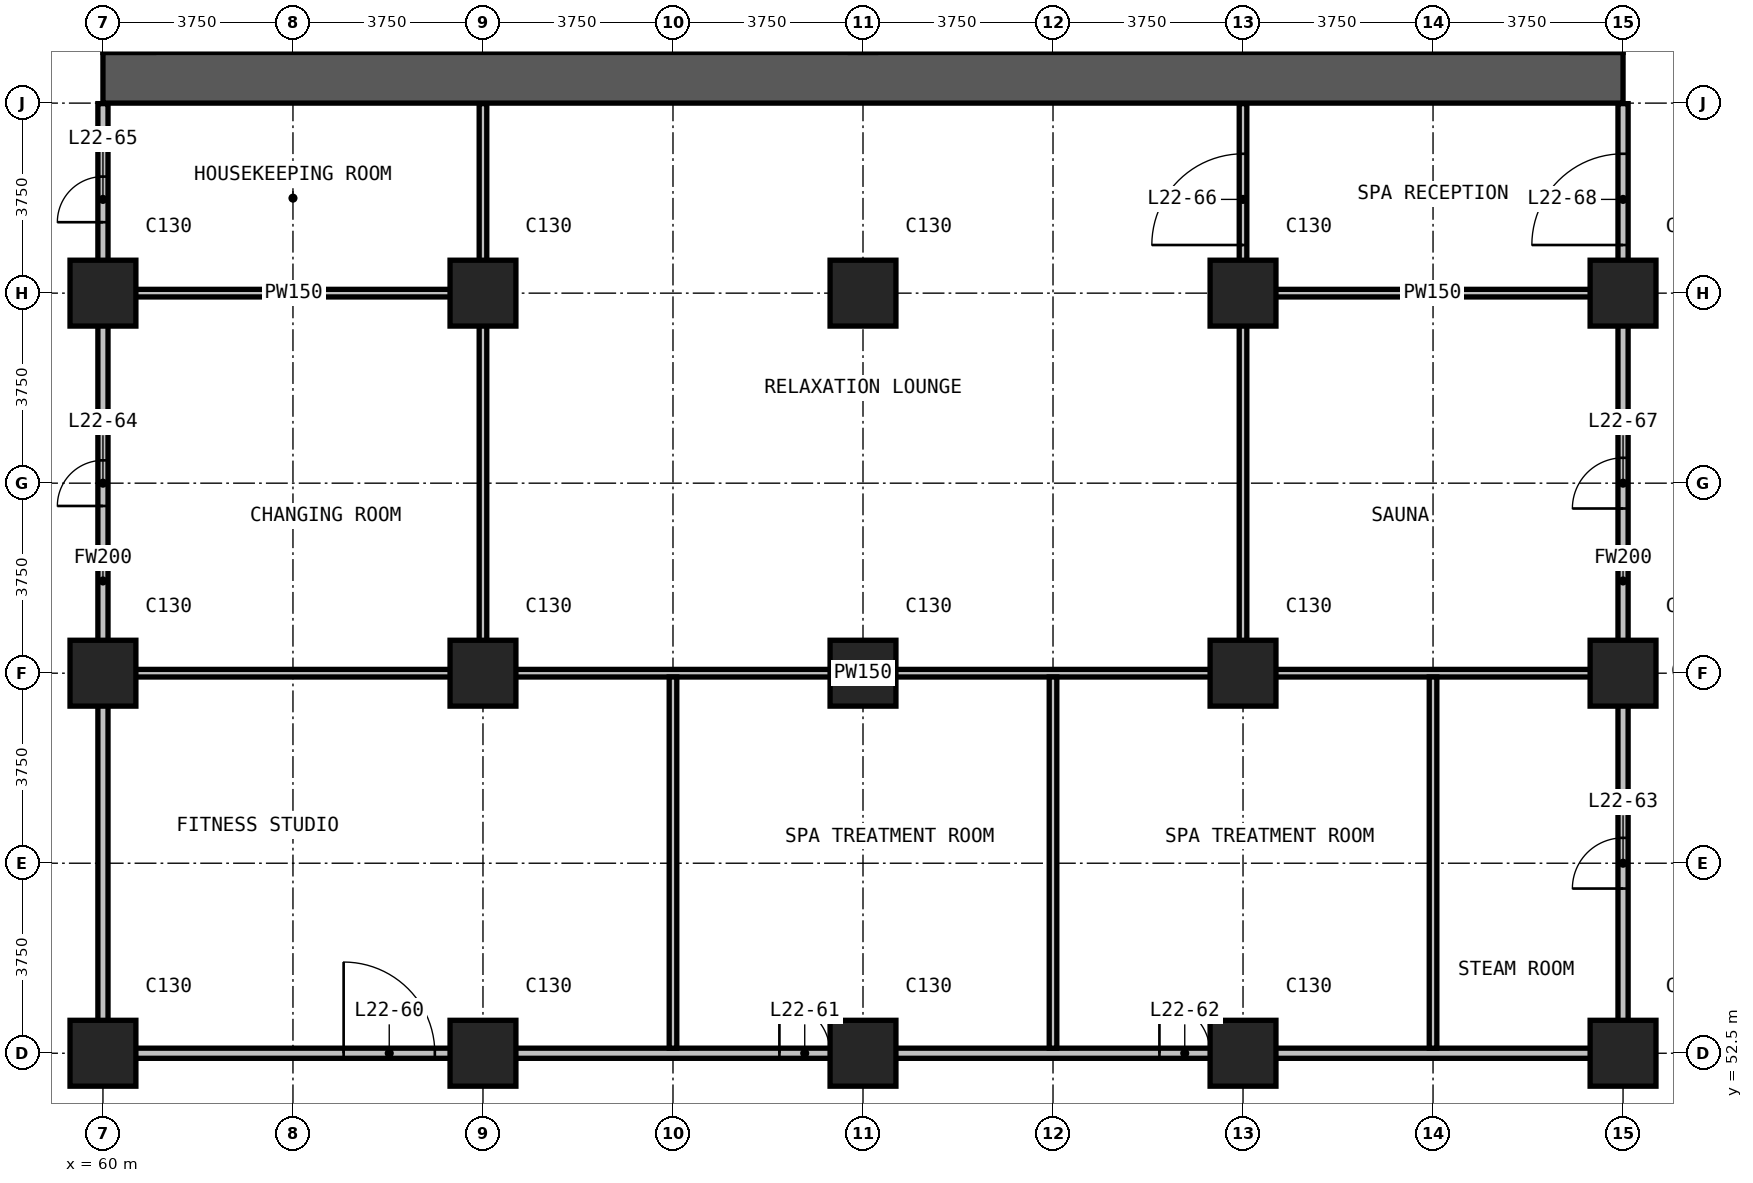
"""IFC4 building model, lengths in metres.
Left out: names, types, materials, properties, quantities, classifications, styles, units other than length and angle.
Written with IfcOpenShell. Run it as: python <this file> out.ifc"""

import sys

from ifc_helpers import new_model, si_unit, direction, frame, frame_2d, origin, origin_2d, place, context, subcontext, project, spatial, rectangle, extrude, element, fill, save


model = new_model("IFC4")
c1 = context("Model", 3, precision=1e-05, world=origin(), true_north=direction((0.0, 1.0)))
c2 = subcontext(c1, "Body", "Model", "MODEL_VIEW")
j1 = project(units=[si_unit("LENGTHUNIT", "METRE"), si_unit("PLANEANGLEUNIT", "RADIAN")], contexts=[c1])
p1 = place(None, origin())
s1 = spatial("IfcSite", under=j1, at=p1, CompositionType="ELEMENT")
p2 = place(p1, origin())
s2 = spatial("IfcBuilding", under=s1, at=p2, CompositionType="ELEMENT")
p3 = place(p2, frame((0.0, 0.0, 92.3)))
s3 = spatial("IfcBuildingStorey", under=s2, at=p3, CompositionType="ELEMENT", Elevation=92.3)
for number, where, z_axis, x_axis in (
    (1, (60.0, 52.5, 0.0), (0.0, 0.0, 1.0), (1.0, 0.0, 0.0)),
    (2, (60.0, 60.0, 0.0), (0.0, 0.0, 1.0), (1.0, 0.0, 0.0)),
    (3, (60.0, 67.5, 0.0), (0.0, 0.0, 1.0), (1.0, 0.0, 0.0)),
    (4, (67.5, 52.5, 0.0), (0.0, 0.0, 1.0), (1.0, 0.0, 0.0)),
    (5, (67.5, 60.0, 0.0), (0.0, 0.0, 1.0), (1.0, 0.0, 0.0)),
    (6, (67.5, 67.5, 0.0), (0.0, 0.0, 1.0), (1.0, 0.0, 0.0)),
    (7, (75.0, 52.5, 0.0), (0.0, 0.0, 1.0), (1.0, 0.0, 0.0)),
    (8, (75.0, 60.0, 0.0), (0.0, 0.0, 1.0), (1.0, 0.0, 0.0)),
    (9, (75.0, 67.5, 0.0), (0.0, 0.0, 1.0), (1.0, 0.0, 0.0)),
    (10, (82.5, 52.5, 0.0), (0.0, 0.0, 1.0), (1.0, 0.0, 0.0)),
    (11, (82.5, 60.0, 0.0), (0.0, 0.0, 1.0), (1.0, 0.0, 0.0)),
    (12, (82.5, 67.5, 0.0), (0.0, 0.0, 1.0), (1.0, 0.0, 0.0)),
    (13, (90.0, 52.5, 0.0), (0.0, 0.0, 1.0), (1.0, 0.0, 0.0)),
    (14, (90.0, 60.0, 0.0), (0.0, 0.0, 1.0), (1.0, 0.0, 0.0)),
    (15, (90.0, 67.5, 0.0), (0.0, 0.0, 1.0), (1.0, 0.0, 0.0)),
):
    element("IfcColumn", number, at=place(p3, frame(where, z_axis=z_axis, x_axis=x_axis)), inside=s3, PredefinedType="COLUMN", context=c2, shape_type="SweptSolid", body=[
        extrude(rectangle(XDim=1.3, YDim=1.3, at=origin_2d()), origin(), (0.0, 0.0, 1.0), 3.3),
    ])
p4 = place(p3, frame((60.0, 71.75, 0.0), z_axis=(0.0, 0.0, 1.0), x_axis=(1.0, 0.0, 0.0)))
e16 = element("IfcWall", 16, at=p4, inside=s3, PredefinedType="SHEAR", context=c2, shape_type="SweptSolid", body=[
    extrude(rectangle(XDim=30.0, YDim=1.0, at=frame_2d((15.0, 0.0))), origin(), (0.0, 0.0, 1.0), 3.3),
])
p5 = place(p3, frame((60.1, 52.5, 0.0), z_axis=(0.0, 0.0, 1.0), x_axis=(1.0, 0.0, 0.0)))
e17 = element("IfcWall", 17, at=p5, inside=s3, PredefinedType="PARTITIONING", context=c2, shape_type="SweptSolid", body=[
    extrude(rectangle(XDim=29.8, YDim=0.2, at=frame_2d((14.9, 0.0))), origin(), (0.0, 0.0, 1.0), 3.0),
])
p6 = place(p5, frame((4.65, 0.0, 0.0)))
e18 = element("IfcOpeningElement", 18, at=p6, cuts=e17, PredefinedType="OPENING", context=c2, shape_type="SweptSolid", body=[
    extrude(rectangle(XDim=1.8, YDim=2.2, at=frame_2d((0.9, 1.1))), frame((0.0, 0.11, 0.0), z_axis=(0.0, -1.0, 0.0), x_axis=(1.0, 0.0, 0.0)), (0.0, 0.0, 1.0), 0.22),
])
p7 = place(p5, frame((13.25, 0.0, 0.0)))
e19 = element("IfcOpeningElement", 19, at=p7, cuts=e17, PredefinedType="OPENING", context=c2, shape_type="SweptSolid", body=[
    extrude(rectangle(XDim=1.0, YDim=2.2, at=frame_2d((0.5, 1.1))), frame((0.0, 0.11, 0.0), z_axis=(0.0, -1.0, 0.0), x_axis=(1.0, 0.0, 0.0)), (0.0, 0.0, 1.0), 0.22),
])
p8 = place(p5, frame((20.75, 0.0, 0.0)))
e20 = element("IfcOpeningElement", 20, at=p8, cuts=e17, PredefinedType="OPENING", context=c2, shape_type="SweptSolid", body=[
    extrude(rectangle(XDim=1.0, YDim=2.2, at=frame_2d((0.5, 1.1))), frame((0.0, 0.11, 0.0), z_axis=(0.0, -1.0, 0.0), x_axis=(1.0, 0.0, 0.0)), (0.0, 0.0, 1.0), 0.22),
])
p9 = place(p3, frame((60.0, 52.4, 0.0), z_axis=(0.0, 0.0, 1.0), x_axis=(0.0, 1.0, 0.0)))
e21 = element("IfcWall", 21, at=p9, inside=s3, PredefinedType="PARTITIONING", context=c2, shape_type="SweptSolid", body=[
    extrude(rectangle(XDim=18.84, YDim=0.2, at=frame_2d((9.42, 0.0))), origin(), (0.0, 0.0, 1.0), 3.0),
])
p10 = place(p9, frame((10.9, 0.0, 0.0)))
e22 = element("IfcOpeningElement", 22, at=p10, cuts=e21, PredefinedType="OPENING", context=c2, shape_type="SweptSolid", body=[
    extrude(rectangle(XDim=0.9, YDim=2.2, at=frame_2d((0.45, 1.1))), frame((0.0, 0.11, 0.0), z_axis=(0.0, -1.0, 0.0), x_axis=(1.0, 0.0, 0.0)), (0.0, 0.0, 1.0), 0.22),
])
p11 = place(p9, frame((16.5, 0.0, 0.0)))
e23 = element("IfcOpeningElement", 23, at=p11, cuts=e21, PredefinedType="OPENING", context=c2, shape_type="SweptSolid", body=[
    extrude(rectangle(XDim=0.9, YDim=2.2, at=frame_2d((0.45, 1.1))), frame((0.0, 0.11, 0.0), z_axis=(0.0, -1.0, 0.0), x_axis=(1.0, 0.0, 0.0)), (0.0, 0.0, 1.0), 0.22),
])
p12 = place(p3, frame((90.0, 52.4, 0.0), z_axis=(0.0, 0.0, 1.0), x_axis=(0.0, 1.0, 0.0)))
e24 = element("IfcWall", 24, at=p12, inside=s3, PredefinedType="PARTITIONING", context=c2, shape_type="SweptSolid", body=[
    extrude(rectangle(XDim=18.84, YDim=0.2, at=frame_2d((9.42, 0.0))), origin(), (0.0, 0.0, 1.0), 3.0),
])
p13 = place(p12, frame((3.35, 0.0, 0.0)))
e25 = element("IfcOpeningElement", 25, at=p13, cuts=e24, PredefinedType="OPENING", context=c2, shape_type="SweptSolid", body=[
    extrude(rectangle(XDim=1.0, YDim=2.2, at=frame_2d((0.5, 1.1))), frame((0.0, 0.11, 0.0), z_axis=(0.0, -1.0, 0.0), x_axis=(1.0, 0.0, 0.0)), (0.0, 0.0, 1.0), 0.22),
])
p14 = place(p12, frame((10.85, 0.0, 0.0)))
e26 = element("IfcOpeningElement", 26, at=p14, cuts=e24, PredefinedType="OPENING", context=c2, shape_type="SweptSolid", body=[
    extrude(rectangle(XDim=1.0, YDim=2.2, at=frame_2d((0.5, 1.1))), frame((0.0, 0.11, 0.0), z_axis=(0.0, -1.0, 0.0), x_axis=(1.0, 0.0, 0.0)), (0.0, 0.0, 1.0), 0.22),
])
p15 = place(p12, frame((16.05, 0.0, 0.0)))
e27 = element("IfcOpeningElement", 27, at=p15, cuts=e24, PredefinedType="OPENING", context=c2, shape_type="SweptSolid", body=[
    extrude(rectangle(XDim=1.8, YDim=2.2, at=frame_2d((0.9, 1.1))), frame((0.0, 0.11, 0.0), z_axis=(0.0, -1.0, 0.0), x_axis=(1.0, 0.0, 0.0)), (0.0, 0.0, 1.0), 0.22),
])
p16 = place(p3, frame((60.1, 60.0, 0.0), z_axis=(0.0, 0.0, 1.0), x_axis=(1.0, 0.0, 0.0)))
e28 = element("IfcWall", 28, at=p16, inside=s3, PredefinedType="PARTITIONING", context=c2, shape_type="SweptSolid", body=[
    extrude(rectangle(XDim=29.8, YDim=0.15, at=frame_2d((14.9, 0.0))), origin(), (0.0, 0.0, 1.0), 3.0),
])
for number, where, z_axis, x_axis in (
    (29, (60.1, 67.5, 0.0), (0.0, 0.0, 1.0), (1.0, 0.0, 0.0)),
    (30, (82.575, 67.5, 0.0), (0.0, 0.0, 1.0), (1.0, 0.0, 0.0)),
):
    element("IfcWall", number, at=place(p3, frame(where, z_axis=z_axis, x_axis=x_axis)), inside=s3, PredefinedType="PARTITIONING", context=c2, shape_type="SweptSolid", body=[
        extrude(rectangle(XDim=7.325, YDim=0.15, at=frame_2d((3.663, 0.0))), origin(), (0.0, 0.0, 1.0), 3.0),
    ])
p17 = place(p3, frame((67.5, 60.075, 0.0), z_axis=(0.0, 0.0, 1.0), x_axis=(0.0, 1.0, 0.0)))
e31 = element("IfcWall", 31, at=p17, inside=s3, PredefinedType="PARTITIONING", context=c2, shape_type="SweptSolid", body=[
    extrude(rectangle(XDim=11.165, YDim=0.15, at=frame_2d((5.583, 0.0))), origin(), (0.0, 0.0, 1.0), 3.0),
])
for number, where, z_axis, x_axis in (
    (32, (71.25, 52.6, 0.0), (0.0, 0.0, 1.0), (0.0, 1.0, 0.0)),
    (33, (78.75, 52.6, 0.0), (0.0, 0.0, 1.0), (0.0, 1.0, 0.0)),
):
    element("IfcWall", number, at=place(p3, frame(where, z_axis=z_axis, x_axis=x_axis)), inside=s3, PredefinedType="PARTITIONING", context=c2, shape_type="SweptSolid", body=[
        extrude(rectangle(XDim=7.325, YDim=0.15, at=frame_2d((3.663, 0.0))), origin(), (0.0, 0.0, 1.0), 3.0),
    ])
p18 = place(p3, frame((82.5, 60.075, 0.0), z_axis=(0.0, 0.0, 1.0), x_axis=(0.0, 1.0, 0.0)))
e34 = element("IfcWall", 34, at=p18, inside=s3, PredefinedType="PARTITIONING", context=c2, shape_type="SweptSolid", body=[
    extrude(rectangle(XDim=11.165, YDim=0.15, at=frame_2d((5.583, 0.0))), origin(), (0.0, 0.0, 1.0), 3.0),
])
p19 = place(p18, frame((8.375, 0.0, 0.0)))
e35 = element("IfcOpeningElement", 35, at=p19, cuts=e34, PredefinedType="OPENING", context=c2, shape_type="SweptSolid", body=[
    extrude(rectangle(XDim=1.8, YDim=2.2, at=frame_2d((0.9, 1.1))), frame((0.0, 0.085, 0.0), z_axis=(0.0, -1.0, 0.0), x_axis=(1.0, 0.0, 0.0)), (0.0, 0.0, 1.0), 0.17),
])
p20 = place(p3, frame((86.25, 52.6, 0.0), z_axis=(0.0, 0.0, 1.0), x_axis=(0.0, 1.0, 0.0)))
e36 = element("IfcWall", 36, at=p20, inside=s3, PredefinedType="PARTITIONING", context=c2, shape_type="SweptSolid", body=[
    extrude(rectangle(XDim=7.325, YDim=0.15, at=frame_2d((3.663, 0.0))), origin(), (0.0, 0.0, 1.0), 3.0),
])
p21 = place(p6, origin())
e37 = element("IfcDoor", 37, at=p21, inside=s3, OperationType="DOUBLE_DOOR_SINGLE_SWING", PredefinedType="DOOR", context=c2, shape_type="SweptSolid", body=[
    extrude(rectangle(XDim=1.8, YDim=2.2, at=frame_2d((0.9, 1.1))), frame((0.0, 0.025, 0.0), z_axis=(0.0, -1.0, 0.0), x_axis=(1.0, 0.0, 0.0)), (0.0, 0.0, 1.0), 0.05),
])
fill(e18, e37)
p22 = place(p7, origin())
e38 = element("IfcDoor", 38, at=p22, inside=s3, OperationType="SINGLE_SWING_LEFT", PredefinedType="DOOR", context=c2, shape_type="SweptSolid", body=[
    extrude(rectangle(XDim=1.0, YDim=2.2, at=frame_2d((0.5, 1.1))), frame((0.0, 0.025, 0.0), z_axis=(0.0, -1.0, 0.0), x_axis=(1.0, 0.0, 0.0)), (0.0, 0.0, 1.0), 0.05),
])
fill(e19, e38)
p23 = place(p8, origin())
e39 = element("IfcDoor", 39, at=p23, inside=s3, OperationType="SINGLE_SWING_LEFT", PredefinedType="DOOR", context=c2, shape_type="SweptSolid", body=[
    extrude(rectangle(XDim=1.0, YDim=2.2, at=frame_2d((0.5, 1.1))), frame((0.0, 0.025, 0.0), z_axis=(0.0, -1.0, 0.0), x_axis=(1.0, 0.0, 0.0)), (0.0, 0.0, 1.0), 0.05),
])
fill(e20, e39)
p24 = place(p13, origin())
e40 = element("IfcDoor", 40, at=p24, inside=s3, OperationType="SINGLE_SWING_RIGHT", PredefinedType="DOOR", context=c2, shape_type="SweptSolid", body=[
    extrude(rectangle(XDim=1.0, YDim=2.2, at=frame_2d((0.5, 1.1))), frame((0.0, 0.025, 0.0), z_axis=(0.0, -1.0, 0.0), x_axis=(1.0, 0.0, 0.0)), (0.0, 0.0, 1.0), 0.05),
])
fill(e25, e40)
p25 = place(p10, origin())
e41 = element("IfcDoor", 41, at=p25, inside=s3, OperationType="SINGLE_SWING_LEFT", PredefinedType="DOOR", context=c2, shape_type="SweptSolid", body=[
    extrude(rectangle(XDim=0.9, YDim=2.2, at=frame_2d((0.45, 1.1))), frame((0.0, 0.025, 0.0), z_axis=(0.0, -1.0, 0.0), x_axis=(1.0, 0.0, 0.0)), (0.0, 0.0, 1.0), 0.05),
])
fill(e22, e41)
p26 = place(p11, origin())
e42 = element("IfcDoor", 42, at=p26, inside=s3, OperationType="SINGLE_SWING_LEFT", PredefinedType="DOOR", context=c2, shape_type="SweptSolid", body=[
    extrude(rectangle(XDim=0.9, YDim=2.2, at=frame_2d((0.45, 1.1))), frame((0.0, 0.025, 0.0), z_axis=(0.0, -1.0, 0.0), x_axis=(1.0, 0.0, 0.0)), (0.0, 0.0, 1.0), 0.05),
])
fill(e23, e42)
p27 = place(p19, origin())
e43 = element("IfcDoor", 43, at=p27, inside=s3, OperationType="DOUBLE_DOOR_SINGLE_SWING", PredefinedType="DOOR", context=c2, shape_type="SweptSolid", body=[
    extrude(rectangle(XDim=1.8, YDim=2.2, at=frame_2d((0.9, 1.1))), frame((0.0, 0.025, 0.0), z_axis=(0.0, -1.0, 0.0), x_axis=(1.0, 0.0, 0.0)), (0.0, 0.0, 1.0), 0.05),
])
fill(e35, e43)
p28 = place(p14, origin())
e44 = element("IfcDoor", 44, at=p28, inside=s3, OperationType="SINGLE_SWING_LEFT", PredefinedType="DOOR", context=c2, shape_type="SweptSolid", body=[
    extrude(rectangle(XDim=1.0, YDim=2.2, at=frame_2d((0.5, 1.1))), frame((0.0, 0.025, 0.0), z_axis=(0.0, -1.0, 0.0), x_axis=(1.0, 0.0, 0.0)), (0.0, 0.0, 1.0), 0.05),
])
fill(e26, e44)
p29 = place(p15, origin())
e45 = element("IfcDoor", 45, at=p29, inside=s3, OperationType="DOUBLE_DOOR_SINGLE_SWING", PredefinedType="DOOR", context=c2, shape_type="SweptSolid", body=[
    extrude(rectangle(XDim=1.8, YDim=2.2, at=frame_2d((0.9, 1.1))), frame((0.0, 0.025, 0.0), z_axis=(0.0, -1.0, 0.0), x_axis=(1.0, 0.0, 0.0)), (0.0, 0.0, 1.0), 0.05),
])
fill(e27, e45)
save(model, sys.argv[1])
